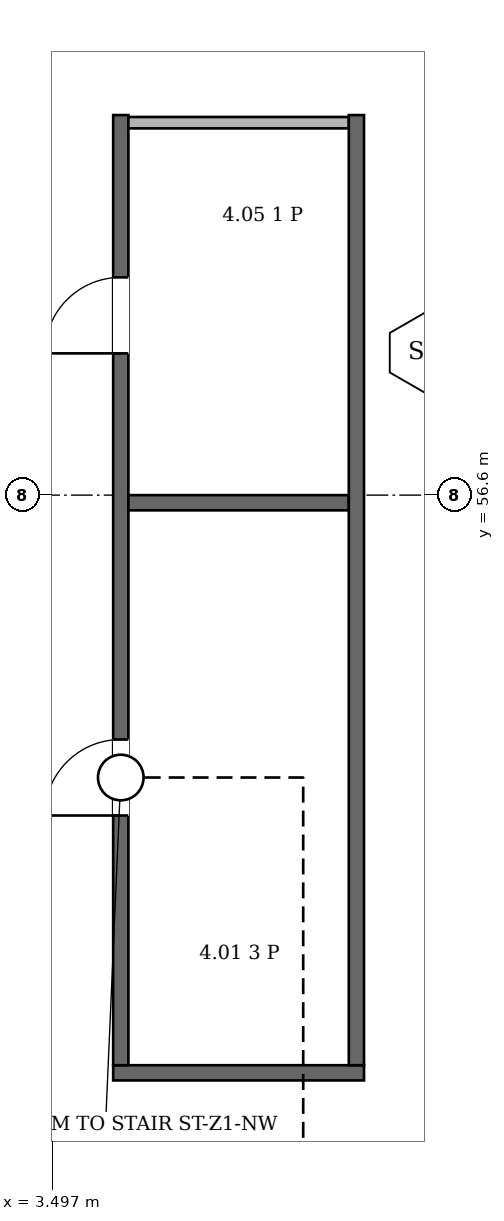
"""IFC4 building model, lengths in metres.
Left out: names, types, materials, properties, quantities, classifications, styles, units other than length and angle.
Written with IfcOpenShell. Run it as: python <this file> out.ifc"""

import sys

from ifc_helpers import new_model, si_unit, direction, frame, frame_2d, origin, place, context, subcontext, project, spatial, rectangle, extrude, element, fill, save


model = new_model("IFC4")
c1 = context("Model", 3, precision=1e-05, world=origin(), true_north=direction((0.0, 1.0)))
c2 = subcontext(c1, "Body", "Model", "MODEL_VIEW")
j1 = project(units=[si_unit("LENGTHUNIT", "METRE"), si_unit("PLANEANGLEUNIT", "RADIAN")], contexts=[c1])
p1 = place(None, origin())
s1 = spatial("IfcSite", under=j1, at=p1, CompositionType="ELEMENT")
p2 = place(p1, origin())
s2 = spatial("IfcBuilding", under=s1, at=p2, CompositionType="ELEMENT")
p3 = place(p2, frame((0.0, 0.0, 26.7)))
s3 = spatial("IfcBuildingStorey", under=s2, at=p3, CompositionType="ELEMENT", Elevation=26.7)
p4 = place(p3, frame((4.3, 49.0, 0.0), z_axis=(0.0, 0.0, 1.0), x_axis=(1.0, 0.0, 0.0)))
e1 = element("IfcWall", 1, at=p4, inside=s3, PredefinedType="PARTITIONING", context=c2, shape_type="SweptSolid", body=[
    extrude(rectangle(XDim=3.3, YDim=0.2, at=frame_2d((1.65, 0.0))), origin(), (0.0, 0.0, 1.0), 4.85),
])
p5 = place(p3, frame((4.4, 49.1, 0.0), z_axis=(0.0, 0.0, 1.0), x_axis=(0.0, 1.0, 0.0)))
e2 = element("IfcWall", 2, at=p5, inside=s3, PredefinedType="PARTITIONING", context=c2, shape_type="SweptSolid", body=[
    extrude(rectangle(XDim=12.5, YDim=0.2, at=frame_2d((6.25, 0.0))), origin(), (0.0, 0.0, 1.0), 4.85),
])
p6 = place(p5, frame((3.285, 0.0, 0.0)))
e3 = element("IfcOpeningElement", 3, at=p6, cuts=e2, PredefinedType="OPENING", context=c2, shape_type="SweptSolid", body=[
    extrude(rectangle(XDim=1.0, YDim=2.1, at=frame_2d((0.5, 1.05))), frame((0.0, 0.11, 0.0), z_axis=(0.0, -1.0, 0.0), x_axis=(1.0, 0.0, 0.0)), (0.0, 0.0, 1.0), 0.22),
])
p7 = place(p5, frame((9.365, 0.0, 0.0)))
e4 = element("IfcOpeningElement", 4, at=p7, cuts=e2, PredefinedType="OPENING", context=c2, shape_type="SweptSolid", body=[
    extrude(rectangle(XDim=1.0, YDim=2.1, at=frame_2d((0.5, 1.05))), frame((0.0, 0.11, 0.0), z_axis=(0.0, -1.0, 0.0), x_axis=(1.0, 0.0, 0.0)), (0.0, 0.0, 1.0), 0.22),
])
p8 = place(p3, frame((4.5, 56.5, 0.0), z_axis=(0.0, 0.0, 1.0), x_axis=(1.0, 0.0, 0.0)))
e5 = element("IfcWall", 5, at=p8, inside=s3, PredefinedType="PARTITIONING", context=c2, shape_type="SweptSolid", body=[
    extrude(rectangle(XDim=2.9, YDim=0.2, at=frame_2d((1.45, 0.0))), origin(), (0.0, 0.0, 1.0), 4.45),
])
p9 = place(p3, frame((4.5, 61.5, 0.0), z_axis=(0.0, 0.0, 1.0), x_axis=(1.0, 0.0, 0.0)))
e6 = element("IfcWall", 6, at=p9, inside=s3, PredefinedType="PARTITIONING", context=c2, shape_type="SweptSolid", body=[
    extrude(rectangle(XDim=2.9, YDim=0.15, at=frame_2d((1.45, 0.0))), origin(), (0.0, 0.0, 1.0), 4.85),
])
p10 = place(p3, frame((7.5, 49.1, 0.0), z_axis=(0.0, 0.0, 1.0), x_axis=(0.0, 1.0, 0.0)))
e7 = element("IfcWall", 7, at=p10, inside=s3, PredefinedType="PARTITIONING", context=c2, shape_type="SweptSolid", body=[
    extrude(rectangle(XDim=12.5, YDim=0.2, at=frame_2d((6.25, 0.0))), origin(), (0.0, 0.0, 1.0), 4.85),
])
p11 = place(p6, origin())
e8 = element("IfcDoor", 8, at=p11, inside=s3, OperationType="SINGLE_SWING_RIGHT", PredefinedType="DOOR", context=c2, shape_type="SweptSolid", body=[
    extrude(rectangle(XDim=1.0, YDim=2.1, at=frame_2d((0.5, 1.05))), frame((0.0, 0.025, 0.0), z_axis=(0.0, -1.0, 0.0), x_axis=(1.0, 0.0, 0.0)), (0.0, 0.0, 1.0), 0.05),
])
fill(e3, e8)
p12 = place(p7, origin())
e9 = element("IfcDoor", 9, at=p12, inside=s3, OperationType="SINGLE_SWING_LEFT", PredefinedType="DOOR", context=c2, shape_type="SweptSolid", body=[
    extrude(rectangle(XDim=1.0, YDim=2.1, at=frame_2d((0.5, 1.05))), frame((0.0, 0.025, 0.0), z_axis=(0.0, -1.0, 0.0), x_axis=(1.0, 0.0, 0.0)), (0.0, 0.0, 1.0), 0.05),
])
fill(e4, e9)
save(model, sys.argv[1])
